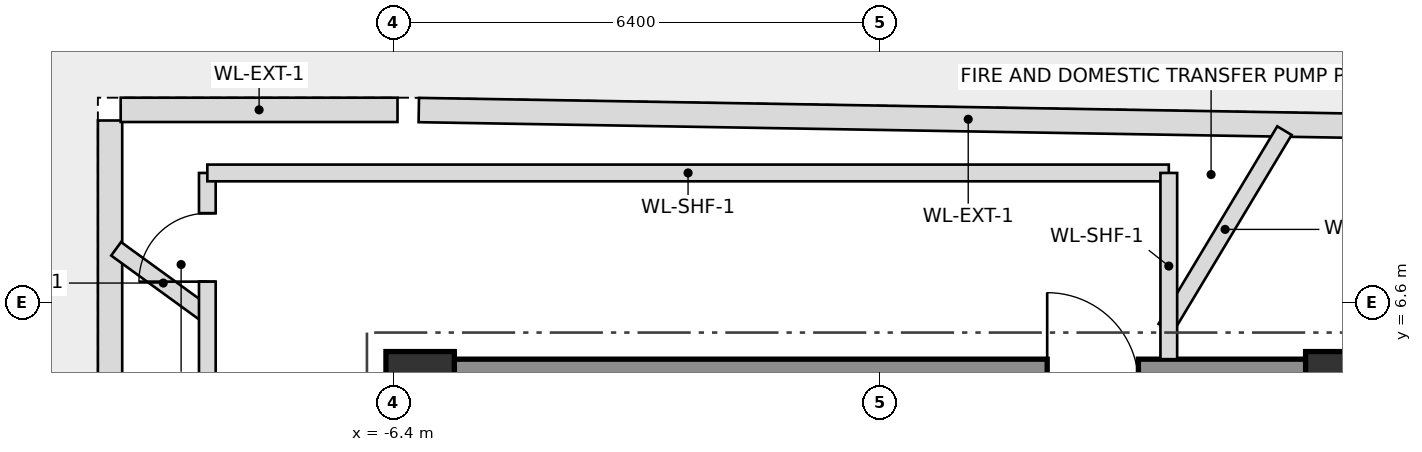
"""IFC4 building model, lengths in metres.
Left out: names, types, materials, properties, quantities, classifications, styles, units other than length and angle.
Written with IfcOpenShell. Run it as: python <this file> out.ifc"""

import sys

from ifc_helpers import new_model, si_unit, direction, frame, frame_2d, origin, origin_2d, place, context, subcontext, project, spatial, rectangle, extrude, source, transform, mapped, element, fill, save


model = new_model("IFC4")
c1 = context("Model", 3, precision=1e-05, world=origin(), true_north=direction((0.0, 1.0)))
c2 = subcontext(c1, "Body", "Model", "MODEL_VIEW")
j1 = project(units=[si_unit("LENGTHUNIT", "METRE"), si_unit("PLANEANGLEUNIT", "RADIAN")], contexts=[c1])
p1 = place(None, origin())
s1 = spatial("IfcSite", under=j1, at=p1, CompositionType="ELEMENT")
p2 = place(p1, origin())
s2 = spatial("IfcBuilding", under=s1, at=p2, CompositionType="ELEMENT")
p3 = place(p2, frame((0.0, 0.0, 153.65)))
s3 = spatial("IfcBuildingStorey", under=s2, at=p3, CompositionType="ELEMENT", Elevation=153.65)
m1 = source(origin(), c2, "Body", "SweptSolid", [
    extrude(rectangle(XDim=0.9, YDim=0.9, at=origin_2d()), origin(), (0.0, 0.0, 1.0), 5.1),
])
for number, where, z_axis, x_axis in (
    (1, (6.05, 5.5, 0.0), (0.0, 0.0, 1.0), (1.0, 0.0, 0.0)),
    (2, (-6.05, 5.5, 0.0), (0.0, 0.0, 1.0), (1.0, 0.0, 0.0)),
):
    element("IfcColumn", number, at=place(p3, frame(where, z_axis=z_axis, x_axis=x_axis)), inside=s3, PredefinedType="COLUMN", context=c2, shape_type="MappedRepresentation", body=[
        mapped(m1, transform((0.0, 0.0, 0.0), scale=1.0)),
    ])
p4 = place(p3, frame((-6.4, 5.525, 0.0), z_axis=(0.0, 0.0, 1.0), x_axis=(1.0, 0.0, 0.0)))
e3 = element("IfcWall", 3, at=p4, inside=s3, PredefinedType="SHEAR", context=c2, shape_type="SweptSolid", body=[
    extrude(rectangle(XDim=12.8, YDim=0.65, at=frame_2d((6.4, 0.0))), origin(), (0.0, 0.0, 1.0), 5.1),
])
p5 = place(p4, frame((8.6, 0.0, 0.0)))
e4 = element("IfcOpeningElement", 4, at=p5, cuts=e3, PredefinedType="OPENING", context=c2, shape_type="SweptSolid", body=[
    extrude(rectangle(XDim=1.2, YDim=2.2, at=frame_2d((0.6, 1.1))), frame((0.0, 0.335, 0.0), z_axis=(0.0, -1.0, 0.0), x_axis=(1.0, 0.0, 0.0)), (0.0, 0.0, 1.0), 0.67),
])
p6 = place(p3, frame((-10.13, 1.97, 0.0), z_axis=(0.0, 0.0, 1.0), x_axis=(0.0, 1.0, 0.0)))
e5 = element("IfcWall", 5, at=p6, inside=s3, PredefinedType="SOLIDWALL", context=c2, shape_type="SweptSolid", body=[
    extrude(rectangle(XDim=7.02, YDim=0.32, at=frame_2d((3.51, 0.0))), origin(), (0.0, 0.0, 1.0), 4.9),
])
p7 = place(p3, frame((-9.99, 9.13, 0.0), z_axis=(0.0, 0.0, 1.0), x_axis=(1.0, 0.0, 0.0)))
e6 = element("IfcWall", 6, at=p7, inside=s3, PredefinedType="SOLIDWALL", context=c2, shape_type="SweptSolid", body=[
    extrude(rectangle(XDim=3.642, YDim=0.32, at=frame_2d((1.821, 0.0))), origin(), (0.0, 0.0, 1.0), 3.555),
])
p8 = place(p3, frame((-6.068, 9.128, 0.0), z_axis=(0.0, 0.0, 1.0), x_axis=(0.999859442252, -0.016765910032, 0.0)))
e7 = element("IfcWall", 7, at=p8, inside=s3, PredefinedType="SOLIDWALL", context=c2, shape_type="SweptSolid", body=[
    extrude(rectangle(XDim=14.46, YDim=0.32, at=frame_2d((7.23, 0.0))), origin(), (0.0, 0.0, 1.0), 3.555),
])
p9 = place(p3, frame((3.76, 6.258, 0.0), z_axis=(0.0, 0.0, 1.0), x_axis=(0.51502853242, 0.857173034336, 0.0)))
e8 = element("IfcWall", 8, at=p9, inside=s3, PredefinedType="PLUMBINGWALL", context=c2, shape_type="SweptSolid", body=[
    extrude(rectangle(XDim=3.032, YDim=0.22, at=frame_2d((1.516, 0.0))), origin(), (0.0, 0.0, 1.0), 4.9),
])
p10 = place(p3, frame((-8.81, 6.401, 0.0), z_axis=(0.0, 0.0, 1.0), x_axis=(-0.809025288471, 0.587773836279, 0.0)))
e9 = element("IfcWall", 9, at=p10, inside=s3, PredefinedType="PLUMBINGWALL", context=c2, shape_type="SweptSolid", body=[
    extrude(rectangle(XDim=1.533, YDim=0.22, at=frame_2d((0.766, 0.0))), origin(), (0.0, 0.0, 1.0), 4.9),
])
p11 = place(p3, frame((-8.85, 1.65, 0.0), z_axis=(0.0, 0.0, 1.0), x_axis=(0.0, 1.0, 0.0)))
e10 = element("IfcWall", 10, at=p11, inside=s3, PredefinedType="PLUMBINGWALL", context=c2, shape_type="SweptSolid", body=[
    extrude(rectangle(XDim=6.65, YDim=0.22, at=frame_2d((3.325, 0.0))), origin(), (0.0, 0.0, 1.0), 4.9),
])
p12 = place(p11, frame((5.22, 0.0, 0.0)))
e11 = element("IfcOpeningElement", 11, at=p12, cuts=e10, PredefinedType="OPENING", context=c2, shape_type="SweptSolid", body=[
    extrude(rectangle(XDim=0.9, YDim=2.05, at=frame_2d((0.45, 1.025))), frame((0.0, 0.12, 0.0), z_axis=(0.0, -1.0, 0.0), x_axis=(1.0, 0.0, 0.0)), (0.0, 0.0, 1.0), 0.24),
])
p13 = place(p3, frame((-8.85, 8.3, 0.0), z_axis=(0.0, 0.0, 1.0), x_axis=(1.0, 0.0, 0.0)))
e12 = element("IfcWall", 12, at=p13, inside=s3, PredefinedType="PLUMBINGWALL", context=c2, shape_type="SweptSolid", body=[
    extrude(rectangle(XDim=12.65, YDim=0.22, at=frame_2d((6.325, 0.0))), origin(), (0.0, 0.0, 1.0), 3.555),
])
p14 = place(p3, frame((3.8, 8.3, 0.0), z_axis=(0.0, 0.0, 1.0), x_axis=(0.0, -1.0, 0.0)))
e13 = element("IfcWall", 13, at=p14, inside=s3, PredefinedType="PLUMBINGWALL", context=c2, shape_type="SweptSolid", body=[
    extrude(rectangle(XDim=2.45, YDim=0.22, at=frame_2d((1.225, 0.0))), origin(), (0.0, 0.0, 1.0), 4.9),
])
p15 = place(p12, origin())
e14 = element("IfcDoor", 14, at=p15, inside=s3, OperationType="SINGLE_SWING_LEFT", PredefinedType="DOOR", context=c2, shape_type="SweptSolid", body=[
    extrude(rectangle(XDim=0.9, YDim=2.05, at=frame_2d((0.45, 1.025))), frame((0.0, 0.025, 0.0), z_axis=(0.0, -1.0, 0.0), x_axis=(1.0, 0.0, 0.0)), (0.0, 0.0, 1.0), 0.05),
])
fill(e11, e14)
save(model, sys.argv[1])
